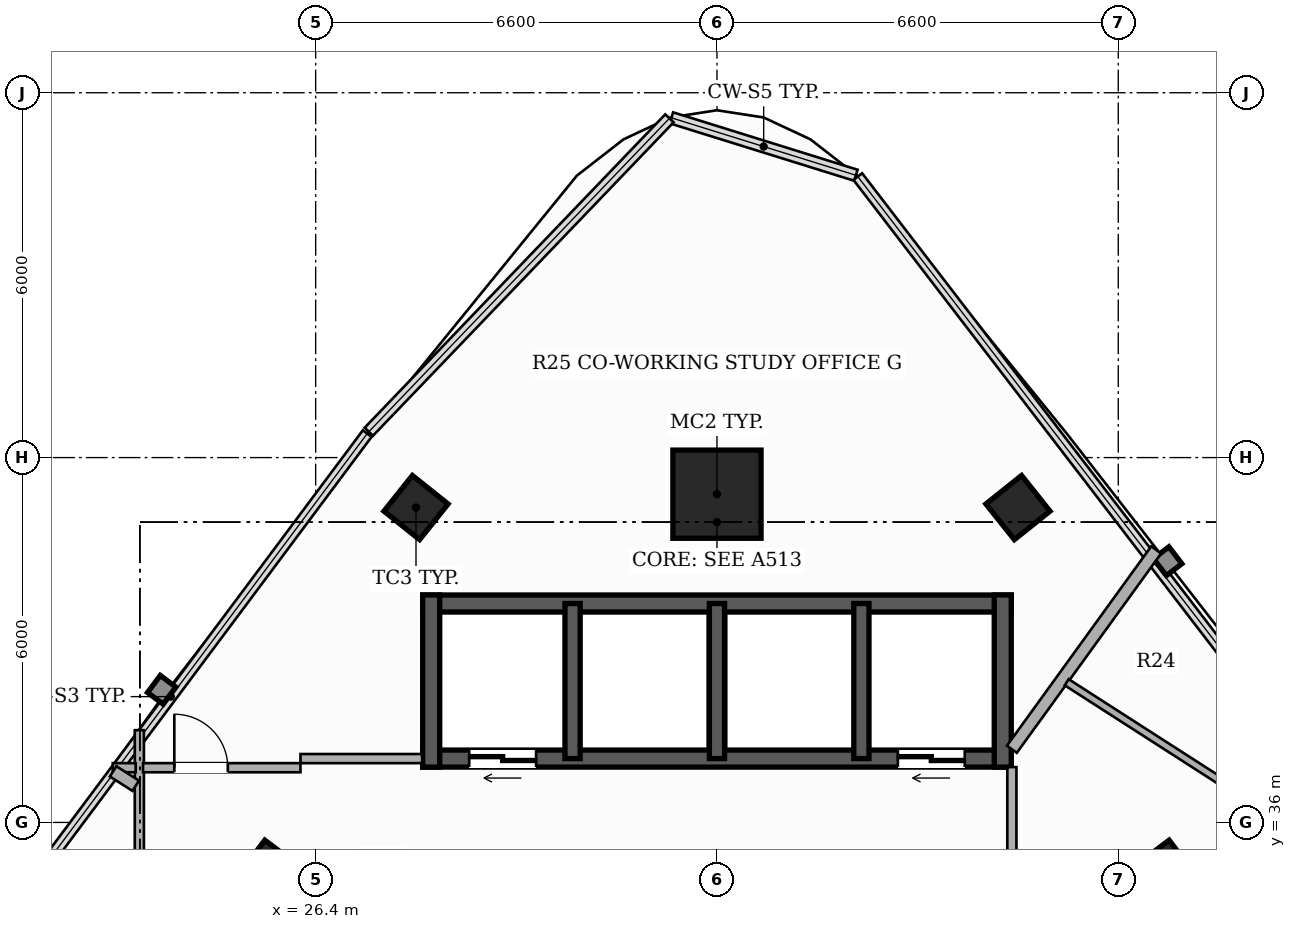
"""IFC4 building model, lengths in metres.
Left out: names, types, materials, properties, quantities, classifications, styles, units other than length and angle.
Written with IfcOpenShell. Run it as: python <this file> out.ifc"""

import sys

from ifc_helpers import new_model, si_unit, direction, frame, frame_2d, origin, origin_2d, place, context, subcontext, project, spatial, rectangle, hollow_rectangle, extrude, element, fill, save


model = new_model("IFC4")
c1 = context("Model", 3, precision=1e-05, world=origin(), true_north=direction((0.0, 1.0)))
c2 = subcontext(c1, "Body", "Model", "MODEL_VIEW")
j1 = project(units=[si_unit("LENGTHUNIT", "METRE"), si_unit("PLANEANGLEUNIT", "RADIAN")], contexts=[c1])
p1 = place(None, origin())
s1 = spatial("IfcSite", under=j1, at=p1, CompositionType="ELEMENT")
p2 = place(p1, origin())
s2 = spatial("IfcBuilding", under=s1, at=p2, CompositionType="ELEMENT")
p3 = place(p2, frame((0.0, 0.0, 170.45)))
s3 = spatial("IfcBuildingStorey", under=s2, at=p3, CompositionType="ELEMENT", Elevation=170.45)
p4 = place(p3, frame((37.84, 37.05, 0.0), z_axis=(0.0, 0.0, 1.0), x_axis=(-1.0, 0.0, 0.0)))
e1 = element("IfcWall", 1, at=p4, inside=s3, PredefinedType="SHEAR", context=c2, shape_type="SweptSolid", body=[
    extrude(rectangle(XDim=9.68, YDim=0.28, at=frame_2d((4.84, 0.0))), origin(), (0.0, 0.0, 1.0), 3.3),
])
p5 = place(p4, frame((7.815, 0.0, 0.0)))
e2 = element("IfcOpeningElement", 2, at=p5, cuts=e1, PredefinedType="OPENING", context=c2, shape_type="SweptSolid", body=[
    extrude(rectangle(XDim=1.1, YDim=2.2, at=frame_2d((0.55, 1.1))), frame((0.0, 0.15, 0.0), z_axis=(0.0, -1.0, 0.0), x_axis=(1.0, 0.0, 0.0)), (0.0, 0.0, 1.0), 0.3),
])
p6 = place(p4, frame((0.765, 0.0, 0.0)))
e3 = element("IfcOpeningElement", 3, at=p6, cuts=e1, PredefinedType="OPENING", context=c2, shape_type="SweptSolid", body=[
    extrude(rectangle(XDim=1.1, YDim=2.2, at=frame_2d((0.55, 1.1))), frame((0.0, 0.15, 0.0), z_axis=(0.0, -1.0, 0.0), x_axis=(1.0, 0.0, 0.0)), (0.0, 0.0, 1.0), 0.3),
])
p7 = place(p3, frame((28.16, 39.6, 0.0), z_axis=(0.0, 0.0, 1.0), x_axis=(1.0, 0.0, 0.0)))
e4 = element("IfcWall", 4, at=p7, inside=s3, PredefinedType="SHEAR", context=c2, shape_type="SweptSolid", body=[
    extrude(rectangle(XDim=9.68, YDim=0.28, at=frame_2d((4.84, 0.0))), origin(), (0.0, 0.0, 1.0), 3.3),
])
for number, where, z_axis, x_axis in (
    (5, (28.3, 36.91, 0.0), (0.0, 0.0, 1.0), (0.0, 1.0, 0.0)),
    (6, (37.7, 36.91, 0.0), (0.0, 0.0, 1.0), (0.0, 1.0, 0.0)),
):
    element("IfcWall", number, at=place(p3, frame(where, z_axis=z_axis, x_axis=x_axis)), inside=s3, PredefinedType="SHEAR", context=c2, shape_type="SweptSolid", body=[
        extrude(rectangle(XDim=2.83, YDim=0.28, at=frame_2d((1.415, 0.0))), origin(), (0.0, 0.0, 1.0), 3.3),
    ])
for number, where, z_axis, x_axis in (
    (7, (30.625, 37.05, 0.0), (0.0, 0.0, 1.0), (0.0, 1.0, 0.0)),
    (8, (33.0, 37.05, 0.0), (0.0, 0.0, 1.0), (0.0, 1.0, 0.0)),
    (9, (35.375, 37.05, 0.0), (0.0, 0.0, 1.0), (0.0, 1.0, 0.0)),
):
    element("IfcWall", number, at=place(p3, frame(where, z_axis=z_axis, x_axis=x_axis)), inside=s3, PredefinedType="SHEAR", context=c2, shape_type="SweptSolid", body=[
        extrude(rectangle(XDim=2.55, YDim=0.25, at=frame_2d((1.275, 0.0))), origin(), (0.0, 0.0, 1.0), 3.3),
    ])
p8 = place(p3, frame((33.0, 41.398, 0.0), z_axis=(0.0, 0.0, 1.0), x_axis=(1.0, 0.0, 0.0)))
e10 = element("IfcColumn", 10, at=p8, inside=s3, PredefinedType="COLUMN", context=c2, shape_type="SweptSolid", body=[
    extrude(hollow_rectangle(XDim=1.45, YDim=1.45, WallThickness=0.045, at=origin_2d()), origin(), (0.0, 0.0, 1.0), 3.3),
])
for number, where, z_axis, x_axis in (
    (11, (25.648, 35.113, 0.0), (0.0, 0.0, 1.0), (0.6, 0.8, 0.0)),
    (12, (40.352, 35.113, 0.0), (0.0, 0.0, 1.0), (-0.6, 0.8, 0.0)),
):
    element("IfcColumn", number, at=place(p3, frame(where, z_axis=z_axis, x_axis=x_axis)), inside=s3, PredefinedType="COLUMN", context=c2, shape_type="SweptSolid", body=[
        extrude(hollow_rectangle(XDim=0.85, YDim=0.85, WallThickness=0.028, at=origin_2d()), origin(), (0.0, 0.0, 1.0), 3.3),
    ])
for number, where, z_axis, x_axis in (
    (13, (28.05, 41.178, 0.0), (0.0, 0.0, 1.0), (0.624, 0.782, 0.0)),
    (14, (37.95, 41.178, 0.0), (0.0, 0.0, 1.0), (-0.624, 0.782, 0.0)),
):
    element("IfcColumn", number, at=place(p3, frame(where, z_axis=z_axis, x_axis=x_axis)), inside=s3, PredefinedType="COLUMN", context=c2, shape_type="SweptSolid", body=[
        extrude(hollow_rectangle(XDim=0.75, YDim=0.75, WallThickness=0.025, at=origin_2d()), origin(), (0.0, 0.0, 1.0), 3.3),
    ])
p9 = place(p3, frame((37.85, 34.65, 0.0), z_axis=(0.0, 0.0, 1.0), x_axis=(0.0, 1.0, 0.0)))
e15 = element("IfcWall", 15, at=p9, inside=s3, PredefinedType="PARTITIONING", context=c2, shape_type="SweptSolid", body=[
    extrude(rectangle(XDim=2.26, YDim=0.15, at=frame_2d((1.13, 0.0))), origin(), (0.0, 0.0, 1.0), 3.06),
])
p10 = place(p3, frame((23.5, 14.06, 0.0), z_axis=(0.0, 0.0, 1.0), x_axis=(0.0, 1.0, 0.0)))
e16 = element("IfcWall", 16, at=p10, inside=s3, PredefinedType="PARTITIONING", context=c2, shape_type="SweptSolid", body=[
    extrude(rectangle(XDim=23.457, YDim=0.15, at=frame_2d((11.729, 0.0))), origin(), (0.0, 0.0, 1.0), 2.413),
])
p11 = place(p10, frame((14.586, 0.0, 0.0)))
e17 = element("IfcOpeningElement", 17, at=p11, cuts=e16, PredefinedType="OPENING", context=c2, shape_type="SweptSolid", body=[
    extrude(rectangle(XDim=0.88, YDim=2.1, at=frame_2d((0.44, 1.05))), frame((0.0, 0.085, 0.0), z_axis=(0.0, -1.0, 0.0), x_axis=(1.0, 0.0, 0.0)), (0.0, 0.0, 1.0), 0.17),
])
p12 = place(p10, frame((3.483, 0.0, 0.0)))
e18 = element("IfcOpeningElement", 18, at=p12, cuts=e16, PredefinedType="OPENING", context=c2, shape_type="SweptSolid", body=[
    extrude(rectangle(XDim=0.92, YDim=2.15, at=frame_2d((0.46, 1.075))), frame((0.0, 0.085, 0.0), z_axis=(0.0, -1.0, 0.0), x_axis=(1.0, 0.0, 0.0)), (0.0, 0.0, 1.0), 0.17),
])
p13 = place(p3, frame((23.063, 36.9, 0.0), z_axis=(0.0, 0.0, 1.0), x_axis=(1.0, 0.0, 0.0)))
e19 = element("IfcWall", 19, at=p13, inside=s3, PredefinedType="PARTITIONING", context=c2, shape_type="SweptSolid", body=[
    extrude(rectangle(XDim=0.377, YDim=0.15, at=frame_2d((0.188, 0.0))), origin(), (0.0, 0.0, 1.0), 3.06),
])
p14 = place(p3, frame((23.56, 36.9, 0.0), z_axis=(0.0, 0.0, 1.0), x_axis=(1.0, 0.0, 0.0)))
e20 = element("IfcWall", 20, at=p14, inside=s3, PredefinedType="PARTITIONING", context=c2, shape_type="SweptSolid", body=[
    extrude(rectangle(XDim=2.59, YDim=0.15, at=frame_2d((1.295, 0.0))), origin(), (0.0, 0.0, 1.0), 2.413),
])
p15 = place(p14, frame((0.515, 0.0, 0.0)))
e21 = element("IfcOpeningElement", 21, at=p15, cuts=e20, PredefinedType="OPENING", context=c2, shape_type="SweptSolid", body=[
    extrude(rectangle(XDim=0.88, YDim=2.1, at=frame_2d((0.44, 1.05))), frame((0.0, 0.085, 0.0), z_axis=(0.0, -1.0, 0.0), x_axis=(1.0, 0.0, 0.0)), (0.0, 0.0, 1.0), 0.17),
])
p16 = place(p3, frame((26.15, 37.05, 0.0), z_axis=(0.0, 0.0, 1.0), x_axis=(1.0, 0.0, 0.0)))
e22 = element("IfcWall", 22, at=p16, inside=s3, PredefinedType="PARTITIONING", context=c2, shape_type="SweptSolid", body=[
    extrude(rectangle(XDim=2.0, YDim=0.15, at=frame_2d((1.0, 0.0))), origin(), (0.0, 0.0, 1.0), 2.413),
])
p17 = place(p3, frame((23.069, 36.84, 0.0), z_axis=(0.0, 0.0, 1.0), x_axis=(0.842563414195, -0.538597152852, 0.0)))
e23 = element("IfcWall", 23, at=p17, inside=s3, PredefinedType="PARTITIONING", context=c2, shape_type="SweptSolid", body=[
    extrude(rectangle(XDim=0.44, YDim=0.2, at=frame_2d((0.22, 0.0))), origin(), (0.0, 0.0, 1.0), 3.06),
])
p18 = place(p3, frame((37.85, 37.203, 0.0), z_axis=(0.0, 0.0, 1.0), x_axis=(0.586236886407, 0.810139687348, 0.0)))
e24 = element("IfcWall", 24, at=p18, inside=s3, PredefinedType="PARTITIONING", context=c2, shape_type="SweptSolid", body=[
    extrude(rectangle(XDim=4.048, YDim=0.2, at=frame_2d((2.024, 0.0))), origin(), (0.0, 0.0, 1.0), 2.413),
])
p19 = place(p3, frame((38.752, 38.305, 0.0), z_axis=(0.0, 0.0, 1.0), x_axis=(0.84140799898, -0.54040038791, 0.0)))
e25 = element("IfcWall", 25, at=p19, inside=s3, PredefinedType="PARTITIONING", context=c2, shape_type="SweptSolid", body=[
    extrude(rectangle(XDim=7.013, YDim=0.12, at=frame_2d((3.507, 0.0))), origin(), (0.0, 0.0, 1.0), 2.413),
])
p20 = place(p19, frame((3.816, 0.0, 0.0)))
e26 = element("IfcOpeningElement", 26, at=p20, cuts=e25, PredefinedType="OPENING", context=c2, shape_type="SweptSolid", body=[
    extrude(rectangle(XDim=0.88, YDim=2.1, at=frame_2d((0.44, 1.05))), frame((0.0, 0.07, 0.0), z_axis=(0.0, -1.0, 0.0), x_axis=(1.0, 0.0, 0.0)), (0.0, 0.0, 1.0), 0.14),
])
p21 = place(p5, origin())
e27 = element("IfcDoor", 27, at=p21, inside=s3, OperationType="DOUBLE_DOOR_SLIDING", PredefinedType="DOOR", context=c2, shape_type="SweptSolid", body=[
    extrude(rectangle(XDim=1.1, YDim=2.2, at=frame_2d((0.55, 1.1))), frame((0.0, 0.025, 0.0), z_axis=(0.0, -1.0, 0.0), x_axis=(1.0, 0.0, 0.0)), (0.0, 0.0, 1.0), 0.05),
])
fill(e2, e27)
p22 = place(p6, origin())
e28 = element("IfcDoor", 28, at=p22, inside=s3, OperationType="DOUBLE_DOOR_SLIDING", PredefinedType="DOOR", context=c2, shape_type="SweptSolid", body=[
    extrude(rectangle(XDim=1.1, YDim=2.2, at=frame_2d((0.55, 1.1))), frame((0.0, 0.025, 0.0), z_axis=(0.0, -1.0, 0.0), x_axis=(1.0, 0.0, 0.0)), (0.0, 0.0, 1.0), 0.05),
])
fill(e3, e28)
p23 = place(p15, origin())
e29 = element("IfcDoor", 29, at=p23, inside=s3, OperationType="SINGLE_SWING_LEFT", PredefinedType="DOOR", context=c2, shape_type="SweptSolid", body=[
    extrude(rectangle(XDim=0.88, YDim=2.1, at=frame_2d((0.44, 1.05))), frame((0.0, 0.025, 0.0), z_axis=(0.0, -1.0, 0.0), x_axis=(1.0, 0.0, 0.0)), (0.0, 0.0, 1.0), 0.05),
])
fill(e21, e29)
save(model, sys.argv[1])
